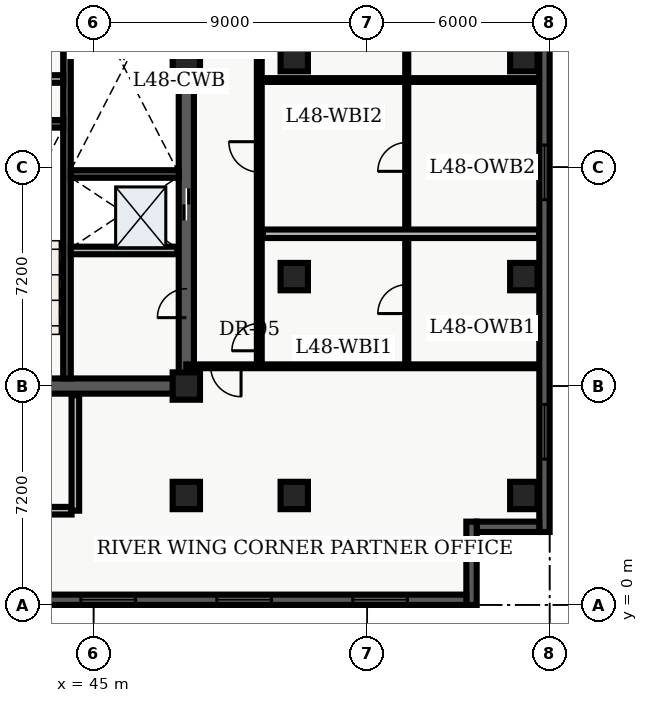
"""IFC4 building model, lengths in metres.
Left out: names, types, materials, properties, quantities, classifications, styles, units other than length and angle.
Written with IfcOpenShell. Run it as: python <this file> out.ifc"""

import sys

from ifc_helpers import new_model, entity, si_unit, converted_unit, direction, frame, origin_with_axes, origin_2d_with_axis, place, context, subcontext, project, spatial, polyline, rectangle, outline, extrude, element, fill, save


model = new_model("IFC4")
c1 = context("Model", 3, precision=1e-05, world=origin_with_axes(), true_north=direction((0.0, 1.0)))
c2 = subcontext(c1, "Body", "Model", "MODEL_VIEW")
j1 = project(units=[si_unit("LENGTHUNIT", "METRE"), converted_unit("PLANEANGLEUNIT", "DEGREE", entity("IfcPlaneAngleMeasure", 0.017), si_unit("PLANEANGLEUNIT", "RADIAN"), dimensions=[0, 0, 0, 0, 0, 0, 0])], contexts=[c1])
p1 = place(None, origin_with_axes())
s1 = spatial("IfcSite", under=j1, at=p1, CompositionType="ELEMENT")
p2 = place(p1, origin_with_axes())
s2 = spatial("IfcBuilding", under=s1, at=p2, CompositionType="ELEMENT")
p3 = place(p2, frame((0.0, 0.0, 196.5), z_axis=(0.0, 0.0, 1.0), x_axis=(1.0, 0.0, 0.0)))
s3 = spatial("IfcBuildingStorey", under=s2, at=p3, CompositionType="ELEMENT", Elevation=196.5)
p4 = place(p3, frame((40.2, 7.2, 0.0), z_axis=(0.0, 0.0, 1.0), x_axis=(1.0, 0.0, 0.0)))
e1 = element("IfcWall", 1, at=p4, inside=s3, PredefinedType="SHEAR", context=c2, shape_type="SweptSolid", body=[
    extrude(outline(polyline([(0.0, -0.25), (7.85, -0.25), (7.85, 0.25), (0.0, 0.25), (0.0, -0.25)])), origin_with_axes(), (0.0, 0.0, 1.0), 3.66),
])
p5 = place(p4, frame((2.175, 0.0, 0.0), z_axis=(0.0, 0.0, 1.0), x_axis=(1.0, 0.0, 0.0)))
e2 = element("IfcOpeningElement", 2, at=p5, cuts=e1, PredefinedType="OPENING", context=c2, shape_type="SweptSolid", body=[
    extrude(rectangle(XDim=1.05, YDim=0.52, at=origin_2d_with_axis()), origin_with_axes(), (0.0, 0.0, 1.0), 2.15),
])
p6 = place(p3, frame((48.05, 7.2, 0.0), z_axis=(0.0, 0.0, 1.0), x_axis=(0.0, 1.0, 0.0)))
e3 = element("IfcWall", 3, at=p6, inside=s3, PredefinedType="SHEAR", context=c2, shape_type="SweptSolid", body=[
    extrude(outline(polyline([(0.0, -0.25), (15.6, -0.25), (15.6, 0.25), (0.0, 0.25), (0.0, -0.25)])), origin_with_axes(), (0.0, 0.0, 1.0), 3.66),
])
p7 = place(p6, frame((5.975, 0.0, 0.0), z_axis=(0.0, 0.0, 1.0), x_axis=(1.0, 0.0, 0.0)))
e4 = element("IfcOpeningElement", 4, at=p7, cuts=e3, PredefinedType="OPENING", context=c2, shape_type="SweptSolid", body=[
    extrude(rectangle(XDim=1.05, YDim=0.52, at=origin_2d_with_axis()), origin_with_axes(), (0.0, 0.0, 1.0), 2.15),
])
p8 = place(p6, frame((2.725, 0.0, 0.0), z_axis=(0.0, 0.0, 1.0), x_axis=(1.0, 0.0, 0.0)))
e5 = element("IfcOpeningElement", 5, at=p8, cuts=e3, PredefinedType="OPENING", context=c2, shape_type="SweptSolid", body=[
    extrude(rectangle(XDim=0.95, YDim=0.52, at=origin_2d_with_axis()), origin_with_axes(), (0.0, 0.0, 1.0), 2.15),
])
p9 = place(p3, frame((44.125, 7.45, 0.0), z_axis=(0.0, 0.0, 1.0), x_axis=(0.0, 1.0, 0.0)))
e6 = element("IfcWall", 6, at=p9, inside=s3, PredefinedType="SHEAR", context=c2, shape_type="SweptSolid", body=[
    extrude(outline(polyline([(0.0, -0.125), (15.1, -0.125), (15.1, 0.125), (0.0, 0.125), (0.0, -0.125)])), origin_with_axes(), (0.0, 0.0, 1.0), 3.66),
])
for number, where, z_axis, x_axis in (
    (7, (40.45, 15.825, 0.0), (0.0, 0.0, 1.0), (1.0, 0.0, 0.0)),
    (8, (44.25, 14.175, 0.0), (0.0, 0.0, 1.0), (1.0, 0.0, 0.0)),
):
    element("IfcWall", number, at=place(p3, frame(where, z_axis=z_axis, x_axis=x_axis)), inside=s3, PredefinedType="SHEAR", context=c2, shape_type="SweptSolid", body=[
        extrude(outline(polyline([(0.0, -0.125), (3.55, -0.125), (3.55, 0.125), (0.0, 0.125), (0.0, -0.125)])), origin_with_axes(), (0.0, 0.0, 1.0), 3.66),
    ])
p10 = place(p3, frame((40.5, 17.3, 0.0), z_axis=(0.0, 0.0, 1.0), x_axis=(1.0, 0.0, 0.0)))
e9 = element("IfcWall", 9, at=p10, inside=s3, PredefinedType="SOLIDWALL", context=c2, shape_type="SweptSolid", body=[
    extrude(outline(polyline([(0.0, -0.125), (3.5, -0.125), (3.5, 0.125), (0.0, 0.125), (0.0, -0.125)])), origin_with_axes(), (0.0, 0.0, 1.0), 2.7),
])
p11 = place(p10, frame((2.4, 0.0, 0.0), z_axis=(0.0, 0.0, 1.0), x_axis=(1.0, 0.0, 0.0)))
e10 = element("IfcOpeningElement", 10, at=p11, cuts=e9, PredefinedType="OPENING", context=c2, shape_type="SweptSolid", body=[
    extrude(rectangle(XDim=0.9, YDim=0.27, at=origin_2d_with_axis()), origin_with_axes(), (0.0, 0.0, 1.0), 2.15),
])
p12 = place(p3, frame((40.325, 3.1, 0.0), z_axis=(0.0, 0.0, 1.0), x_axis=(1.0, 0.0, 0.0)))
e11 = element("IfcWall", 11, at=p12, inside=s3, PredefinedType="SOLIDWALL", context=c2, shape_type="SweptSolid", body=[
    extrude(outline(polyline([(0.0, -0.125), (3.95, -0.125), (3.95, 0.125), (0.0, 0.125), (0.0, -0.125)])), origin_with_axes(), (0.0, 0.0, 1.0), 2.7),
])
p13 = place(p3, frame((44.4, 3.1, 0.0), z_axis=(0.0, 0.0, 1.0), x_axis=(0.0, 1.0, 0.0)))
e12 = element("IfcWall", 12, at=p13, inside=s3, PredefinedType="SOLIDWALL", context=c2, shape_type="SweptSolid", body=[
    extrude(outline(polyline([(0.0, -0.125), (3.8, -0.125), (3.8, 0.125), (0.0, 0.125), (0.0, -0.125)])), origin_with_axes(), (0.0, 0.0, 1.0), 2.7),
])
for number, where, z_axis, x_axis in (
    (13, (48.05, 3.6, 0.0), (0.0, 0.0, 1.0), (1.0, 0.0, 0.0)),
    (14, (48.05, 7.2, 0.0), (0.0, 0.0, 1.0), (1.0, 0.0, 0.0)),
    (15, (48.05, 18.0, 0.0), (0.0, 0.0, 1.0), (1.0, 0.0, 0.0)),
    (16, (51.6, 3.6, 0.0), (0.0, 0.0, 1.0), (1.0, 0.0, 0.0)),
    (17, (51.6, 10.8, 0.0), (0.0, 0.0, 1.0), (1.0, 0.0, 0.0)),
    (18, (51.6, 18.0, 0.0), (0.0, 0.0, 1.0), (1.0, 0.0, 0.0)),
    (19, (59.15, 3.6, 0.0), (0.0, 0.0, 1.0), (1.0, 0.0, 0.0)),
    (20, (59.15, 10.8, 0.0), (0.0, 0.0, 1.0), (1.0, 0.0, 0.0)),
    (21, (59.15, 18.0, 0.0), (0.0, 0.0, 1.0), (1.0, 0.0, 0.0)),
):
    element("IfcColumn", number, at=place(p3, frame(where, z_axis=z_axis, x_axis=x_axis)), inside=s3, PredefinedType="COLUMN", context=c2, shape_type="SweptSolid", body=[
        extrude(rectangle(XDim=0.9, YDim=0.9, at=origin_2d_with_axis()), origin_with_axes(), (0.0, 0.0, 1.0), 3.9),
    ])
p14 = place(p3, frame((44.25, 11.66, 0.0), z_axis=(0.0, 0.0, 1.0), x_axis=(1.0, 0.0, 0.0)))
e22 = element("IfcWall", 22, at=p14, inside=s3, PredefinedType="SOLIDWALL", context=c2, shape_type="SweptSolid", body=[
    extrude(outline(polyline([(0.0, -0.125), (3.5, -0.125), (3.5, 0.125), (0.0, 0.125), (0.0, -0.125)])), origin_with_axes(), (0.0, 0.0, 1.0), 2.7),
])
p15 = place(p3, frame((50.45, 7.85, 0.0), z_axis=(0.0, 0.0, 1.0), x_axis=(0.0, 1.0, 0.0)))
e23 = element("IfcWall", 23, at=p15, inside=s3, PredefinedType="PARTITIONING", context=c2, shape_type="SweptSolid", body=[
    extrude(outline(polyline([(0.0, -0.08), (18.8, -0.08), (18.8, 0.08), (0.0, 0.08), (0.0, -0.08)])), origin_with_axes(), (0.0, 0.0, 1.0), 2.7),
])
p16 = place(p15, frame((0.96, 0.0, 0.0), z_axis=(0.0, 0.0, 1.0), x_axis=(1.0, 0.0, 0.0)))
e24 = element("IfcOpeningElement", 24, at=p16, cuts=e23, PredefinedType="OPENING", context=c2, shape_type="SweptSolid", body=[
    extrude(rectangle(XDim=0.9, YDim=0.18, at=origin_2d_with_axis()), origin_with_axes(), (0.0, 0.0, 1.0), 2.15),
])
p17 = place(p15, frame((6.888, 0.0, 0.0), z_axis=(0.0, 0.0, 1.0), x_axis=(1.0, 0.0, 0.0)))
e25 = element("IfcOpeningElement", 25, at=p17, cuts=e23, PredefinedType="OPENING", context=c2, shape_type="SweptSolid", body=[
    extrude(rectangle(XDim=1.0, YDim=0.18, at=origin_2d_with_axis()), origin_with_axes(), (0.0, 0.0, 1.0), 2.15),
])
p18 = place(p15, frame((12.353, 0.0, 0.0), z_axis=(0.0, 0.0, 1.0), x_axis=(1.0, 0.0, 0.0)))
e26 = element("IfcOpeningElement", 26, at=p18, cuts=e23, PredefinedType="OPENING", context=c2, shape_type="SweptSolid", body=[
    extrude(rectangle(XDim=1.0, YDim=0.18, at=origin_2d_with_axis()), origin_with_axes(), (0.0, 0.0, 1.0), 2.15),
])
p19 = place(p15, frame((17.575, 0.0, 0.0), z_axis=(0.0, 0.0, 1.0), x_axis=(1.0, 0.0, 0.0)))
e27 = element("IfcOpeningElement", 27, at=p19, cuts=e23, PredefinedType="OPENING", context=c2, shape_type="SweptSolid", body=[
    extrude(rectangle(XDim=1.0, YDim=0.18, at=origin_2d_with_axis()), origin_with_axes(), (0.0, 0.0, 1.0), 2.15),
])
p20 = place(p3, frame((59.665, 7.85, 0.0), z_axis=(0.0, 0.0, 1.0), x_axis=(-1.0, 0.0, 0.0)))
e28 = element("IfcWall", 28, at=p20, inside=s3, PredefinedType="PARTITIONING", context=c2, shape_type="SweptSolid", body=[
    extrude(outline(polyline([(0.0, -0.062), (11.615, -0.062), (11.615, 0.062), (0.0, 0.062), (0.0, -0.062)])), origin_with_axes(), (0.0, 0.0, 1.0), 2.7),
])
p21 = place(p20, frame((10.315, 0.0, 0.0), z_axis=(0.0, 0.0, 1.0), x_axis=(1.0, 0.0, 0.0)))
e29 = element("IfcOpeningElement", 29, at=p21, cuts=e28, PredefinedType="OPENING", context=c2, shape_type="SweptSolid", body=[
    extrude(rectangle(XDim=1.0, YDim=0.145, at=origin_2d_with_axis()), origin_with_axes(), (0.0, 0.0, 1.0), 2.15),
])
p22 = place(p3, frame((55.3, 7.98, 0.0), z_axis=(0.0, 0.0, 1.0), x_axis=(0.0, 1.0, 0.0)))
e30 = element("IfcWall", 30, at=p22, inside=s3, PredefinedType="PARTITIONING", context=c2, shape_type="SweptSolid", body=[
    extrude(outline(polyline([(0.0, -0.05), (18.54, -0.05), (18.54, 0.05), (0.0, 0.05), (0.0, -0.05)])), origin_with_axes(), (0.0, 0.0, 1.0), 2.7),
])
p23 = place(p22, frame((2.079, 0.0, 0.0), z_axis=(0.0, 0.0, 1.0), x_axis=(1.0, 0.0, 0.0)))
e31 = element("IfcOpeningElement", 31, at=p23, cuts=e30, PredefinedType="OPENING", context=c2, shape_type="SweptSolid", body=[
    extrude(rectangle(XDim=0.95, YDim=0.12, at=origin_2d_with_axis()), origin_with_axes(), (0.0, 0.0, 1.0), 2.15),
])
p24 = place(p22, frame((6.758, 0.0, 0.0), z_axis=(0.0, 0.0, 1.0), x_axis=(1.0, 0.0, 0.0)))
e32 = element("IfcOpeningElement", 32, at=p24, cuts=e30, PredefinedType="OPENING", context=c2, shape_type="SweptSolid", body=[
    extrude(rectangle(XDim=0.95, YDim=0.12, at=origin_2d_with_axis()), origin_with_axes(), (0.0, 0.0, 1.0), 2.15),
])
p25 = place(p22, frame((12.223, 0.0, 0.0), z_axis=(0.0, 0.0, 1.0), x_axis=(1.0, 0.0, 0.0)))
e33 = element("IfcOpeningElement", 33, at=p25, cuts=e30, PredefinedType="OPENING", context=c2, shape_type="SweptSolid", body=[
    extrude(rectangle(XDim=0.95, YDim=0.12, at=origin_2d_with_axis()), origin_with_axes(), (0.0, 0.0, 1.0), 2.15),
])
p26 = place(p22, frame((16.885, 0.0, 0.0), z_axis=(0.0, 0.0, 1.0), x_axis=(1.0, 0.0, 0.0)))
e34 = element("IfcOpeningElement", 34, at=p26, cuts=e30, PredefinedType="OPENING", context=c2, shape_type="SweptSolid", body=[
    extrude(rectangle(XDim=0.95, YDim=0.12, at=origin_2d_with_axis()), origin_with_axes(), (0.0, 0.0, 1.0), 2.15),
])
p27 = place(p3, frame((50.57, 12.209, 0.0), z_axis=(0.0, 0.0, 1.0), x_axis=(1.0, 0.0, 0.0)))
e35 = element("IfcWall", 35, at=p27, inside=s3, PredefinedType="PARTITIONING", context=c2, shape_type="SweptSolid", body=[
    extrude(outline(polyline([(0.0, -0.14), (9.095, -0.14), (9.095, 0.14), (0.0, 0.14), (0.0, -0.14)])), origin_with_axes(), (0.0, 0.0, 1.0), 2.7),
])
p28 = place(p3, frame((50.57, 17.266, 0.0), z_axis=(0.0, 0.0, 1.0), x_axis=(1.0, 0.0, 0.0)))
e36 = element("IfcWall", 36, at=p28, inside=s3, PredefinedType="PARTITIONING", context=c2, shape_type="SweptSolid", body=[
    extrude(outline(polyline([(0.0, -0.062), (9.095, -0.062), (9.095, 0.062), (0.0, 0.062), (0.0, -0.062)])), origin_with_axes(), (0.0, 0.0, 1.0), 2.7),
])
p29 = place(p3, frame((59.83, 26.06, 0.0), z_axis=(0.0, 0.0, 1.0), x_axis=(0.0, -1.0, 0.0)))
e37 = element("IfcWall", 37, at=p29, inside=s3, PredefinedType="SOLIDWALL", context=c2, shape_type="SweptSolid", body=[
    extrude(outline(polyline([(0.0, -0.17), (23.66, -0.17), (23.66, 0.17), (0.0, 0.17), (0.0, -0.17)])), origin_with_axes(), (0.0, 0.0, 1.0), 3.66),
])
p30 = place(p29, frame((11.83, 0.0, 0.45), z_axis=(0.0, 0.0, 1.0), x_axis=(1.0, 0.0, 0.0)))
e38 = element("IfcOpeningElement", 38, at=p30, cuts=e37, PredefinedType="OPENING", context=c2, shape_type="SweptSolid", body=[
    extrude(rectangle(XDim=1.8, YDim=0.36, at=origin_2d_with_axis()), origin_with_axes(), (0.0, 0.0, 1.0), 2.1),
])
p31 = place(p29, frame((20.364, 0.0, 0.45), z_axis=(0.0, 0.0, 1.0), x_axis=(1.0, 0.0, 0.0)))
e39 = element("IfcOpeningElement", 39, at=p31, cuts=e37, PredefinedType="OPENING", context=c2, shape_type="SweptSolid", body=[
    extrude(rectangle(XDim=1.8, YDim=0.36, at=origin_2d_with_axis()), origin_with_axes(), (0.0, 0.0, 1.0), 2.1),
])
p32 = place(p3, frame((59.66, 2.57, 0.0), z_axis=(0.0, 0.0, 1.0), x_axis=(-1.0, 0.0, 0.0)))
e40 = element("IfcWall", 40, at=p32, inside=s3, PredefinedType="SOLIDWALL", context=c2, shape_type="SweptSolid", body=[
    extrude(outline(polyline([(0.0, -0.17), (2.06, -0.17), (2.06, 0.17), (0.0, 0.17), (0.0, -0.17)])), origin_with_axes(), (0.0, 0.0, 1.0), 3.66),
])
p33 = place(p3, frame((57.43, 2.74, 0.0), z_axis=(0.0, 0.0, 1.0), x_axis=(0.0, -1.0, 0.0)))
e41 = element("IfcWall", 41, at=p33, inside=s3, PredefinedType="SOLIDWALL", context=c2, shape_type="SweptSolid", body=[
    extrude(outline(polyline([(0.0, -0.17), (2.74, -0.17), (2.74, 0.17), (0.0, 0.17), (0.0, -0.17)])), origin_with_axes(), (0.0, 0.0, 1.0), 3.66),
])
p34 = place(p3, frame((57.26, 0.17, 0.0), z_axis=(0.0, 0.0, 1.0), x_axis=(-1.0, 0.0, 0.0)))
e42 = element("IfcWall", 42, at=p34, inside=s3, PredefinedType="SOLIDWALL", context=c2, shape_type="SweptSolid", body=[
    extrude(outline(polyline([(0.0, -0.17), (54.86, -0.17), (54.86, 0.17), (0.0, 0.17), (0.0, -0.17)])), origin_with_axes(), (0.0, 0.0, 1.0), 3.66),
])
p35 = place(p34, frame((2.836, 0.0, 0.45), z_axis=(0.0, 0.0, 1.0), x_axis=(1.0, 0.0, 0.0)))
e43 = element("IfcOpeningElement", 43, at=p35, cuts=e42, PredefinedType="OPENING", context=c2, shape_type="SweptSolid", body=[
    extrude(rectangle(XDim=1.8, YDim=0.36, at=origin_2d_with_axis()), origin_with_axes(), (0.0, 0.0, 1.0), 2.1),
])
p36 = place(p34, frame((7.307, 0.0, 0.45), z_axis=(0.0, 0.0, 1.0), x_axis=(1.0, 0.0, 0.0)))
e44 = element("IfcOpeningElement", 44, at=p36, cuts=e42, PredefinedType="OPENING", context=c2, shape_type="SweptSolid", body=[
    extrude(rectangle(XDim=1.8, YDim=0.36, at=origin_2d_with_axis()), origin_with_axes(), (0.0, 0.0, 1.0), 2.1),
])
p37 = place(p34, frame((11.779, 0.0, 0.45), z_axis=(0.0, 0.0, 1.0), x_axis=(1.0, 0.0, 0.0)))
e45 = element("IfcOpeningElement", 45, at=p37, cuts=e42, PredefinedType="OPENING", context=c2, shape_type="SweptSolid", body=[
    extrude(rectangle(XDim=1.8, YDim=0.36, at=origin_2d_with_axis()), origin_with_axes(), (0.0, 0.0, 1.0), 2.1),
])
p38 = place(p34, frame((16.251, 0.0, 0.45), z_axis=(0.0, 0.0, 1.0), x_axis=(1.0, 0.0, 0.0)))
e46 = element("IfcOpeningElement", 46, at=p38, cuts=e42, PredefinedType="OPENING", context=c2, shape_type="SweptSolid", body=[
    extrude(rectangle(XDim=1.8, YDim=0.36, at=origin_2d_with_axis()), origin_with_axes(), (0.0, 0.0, 1.0), 2.1),
])
p39 = place(p34, frame((20.723, 0.0, 0.45), z_axis=(0.0, 0.0, 1.0), x_axis=(1.0, 0.0, 0.0)))
e47 = element("IfcOpeningElement", 47, at=p39, cuts=e42, PredefinedType="OPENING", context=c2, shape_type="SweptSolid", body=[
    extrude(rectangle(XDim=1.8, YDim=0.36, at=origin_2d_with_axis()), origin_with_axes(), (0.0, 0.0, 1.0), 2.1),
])
p40 = place(p34, frame((34.138, 0.0, 0.45), z_axis=(0.0, 0.0, 1.0), x_axis=(1.0, 0.0, 0.0)))
e48 = element("IfcOpeningElement", 48, at=p40, cuts=e42, PredefinedType="OPENING", context=c2, shape_type="SweptSolid", body=[
    extrude(rectangle(XDim=1.8, YDim=0.36, at=origin_2d_with_axis()), origin_with_axes(), (0.0, 0.0, 1.0), 2.1),
])
p41 = place(p34, frame((38.609, 0.0, 0.45), z_axis=(0.0, 0.0, 1.0), x_axis=(1.0, 0.0, 0.0)))
e49 = element("IfcOpeningElement", 49, at=p41, cuts=e42, PredefinedType="OPENING", context=c2, shape_type="SweptSolid", body=[
    extrude(rectangle(XDim=1.8, YDim=0.36, at=origin_2d_with_axis()), origin_with_axes(), (0.0, 0.0, 1.0), 2.1),
])
p42 = place(p34, frame((43.531, 0.0, 0.45), z_axis=(0.0, 0.0, 1.0), x_axis=(1.0, 0.0, 0.0)))
e50 = element("IfcOpeningElement", 50, at=p42, cuts=e42, PredefinedType="OPENING", context=c2, shape_type="SweptSolid", body=[
    extrude(rectangle(XDim=1.8, YDim=0.36, at=origin_2d_with_axis()), origin_with_axes(), (0.0, 0.0, 1.0), 2.1),
])
p43 = place(p34, frame((47.553, 0.0, 0.45), z_axis=(0.0, 0.0, 1.0), x_axis=(1.0, 0.0, 0.0)))
e51 = element("IfcOpeningElement", 51, at=p43, cuts=e42, PredefinedType="OPENING", context=c2, shape_type="SweptSolid", body=[
    extrude(rectangle(XDim=1.8, YDim=0.36, at=origin_2d_with_axis()), origin_with_axes(), (0.0, 0.0, 1.0), 2.1),
])
p44 = place(p34, frame((52.024, 0.0, 0.45), z_axis=(0.0, 0.0, 1.0), x_axis=(1.0, 0.0, 0.0)))
e52 = element("IfcOpeningElement", 52, at=p44, cuts=e42, PredefinedType="OPENING", context=c2, shape_type="SweptSolid", body=[
    extrude(rectangle(XDim=1.8, YDim=0.36, at=origin_2d_with_axis()), origin_with_axes(), (0.0, 0.0, 1.0), 2.1),
])
p45 = place(p6, frame((5.975, 0.0, 0.0), z_axis=(0.0, 0.0, 1.0), x_axis=(1.0, 0.0, 0.0)))
e53 = element("IfcDoor", 53, at=p45, inside=s3, OperationType="SLIDING_TO_LEFT", PredefinedType="DOOR", context=c2, shape_type="SweptSolid", body=[
    extrude(rectangle(XDim=1.05, YDim=0.09, at=origin_2d_with_axis()), origin_with_axes(), (0.0, 0.0, 1.0), 2.15),
])
fill(e4, e53)
p46 = place(p6, frame((2.725, 0.0, 0.0), z_axis=(0.0, 0.0, 1.0), x_axis=(1.0, 0.0, 0.0)))
e54 = element("IfcDoor", 54, at=p46, inside=s3, OperationType="SINGLE_SWING_LEFT", PredefinedType="DOOR", context=c2, shape_type="SweptSolid", body=[
    extrude(rectangle(XDim=0.95, YDim=0.09, at=origin_2d_with_axis()), origin_with_axes(), (0.0, 0.0, 1.0), 2.15),
])
fill(e5, e54)
p47 = place(p20, frame((10.315, 0.0, 0.0), z_axis=(0.0, 0.0, 1.0), x_axis=(1.0, 0.0, 0.0)))
e55 = element("IfcDoor", 55, at=p47, inside=s3, OperationType="SINGLE_SWING_LEFT", PredefinedType="DOOR", context=c2, shape_type="SweptSolid", body=[
    extrude(rectangle(XDim=1.0, YDim=0.075, at=origin_2d_with_axis()), origin_with_axes(), (0.0, 0.0, 1.0), 2.15),
])
fill(e29, e55)
p48 = place(p22, frame((2.079, 0.0, 0.0), z_axis=(0.0, 0.0, 1.0), x_axis=(1.0, 0.0, 0.0)))
e56 = element("IfcDoor", 56, at=p48, inside=s3, OperationType="SINGLE_SWING_LEFT", PredefinedType="DOOR", context=c2, shape_type="SweptSolid", body=[
    extrude(rectangle(XDim=0.95, YDim=0.06, at=origin_2d_with_axis()), origin_with_axes(), (0.0, 0.0, 1.0), 2.15),
])
fill(e31, e56)
p49 = place(p15, frame((0.96, 0.0, 0.0), z_axis=(0.0, 0.0, 1.0), x_axis=(1.0, 0.0, 0.0)))
e57 = element("IfcDoor", 57, at=p49, inside=s3, OperationType="SINGLE_SWING_LEFT", PredefinedType="DOOR", context=c2, shape_type="SweptSolid", body=[
    extrude(rectangle(XDim=0.9, YDim=0.09, at=origin_2d_with_axis()), origin_with_axes(), (0.0, 0.0, 1.0), 2.15),
])
fill(e24, e57)
p50 = place(p22, frame((6.758, 0.0, 0.0), z_axis=(0.0, 0.0, 1.0), x_axis=(1.0, 0.0, 0.0)))
e58 = element("IfcDoor", 58, at=p50, inside=s3, OperationType="SINGLE_SWING_LEFT", PredefinedType="DOOR", context=c2, shape_type="SweptSolid", body=[
    extrude(rectangle(XDim=0.95, YDim=0.06, at=origin_2d_with_axis()), origin_with_axes(), (0.0, 0.0, 1.0), 2.15),
])
fill(e32, e58)
p51 = place(p15, frame((6.888, 0.0, 0.0), z_axis=(0.0, 0.0, 1.0), x_axis=(1.0, 0.0, 0.0)))
e59 = element("IfcDoor", 59, at=p51, inside=s3, OperationType="SINGLE_SWING_RIGHT", PredefinedType="DOOR", context=c2, shape_type="SweptSolid", body=[
    extrude(rectangle(XDim=1.0, YDim=0.09, at=origin_2d_with_axis()), origin_with_axes(), (0.0, 0.0, 1.0), 2.15),
])
fill(e25, e59)
p52 = place(p29, frame((11.83, 0.0, 0.45), z_axis=(0.0, 0.0, 1.0), x_axis=(1.0, 0.0, 0.0)))
e60 = element("IfcWindow", 60, at=p52, inside=s3, PredefinedType="WINDOW", context=c2, shape_type="SweptSolid", body=[
    extrude(rectangle(XDim=1.8, YDim=0.09, at=origin_2d_with_axis()), origin_with_axes(), (0.0, 0.0, 1.0), 2.1),
])
fill(e38, e60)
p53 = place(p29, frame((20.364, 0.0, 0.45), z_axis=(0.0, 0.0, 1.0), x_axis=(1.0, 0.0, 0.0)))
e61 = element("IfcWindow", 61, at=p53, inside=s3, PredefinedType="WINDOW", context=c2, shape_type="SweptSolid", body=[
    extrude(rectangle(XDim=1.8, YDim=0.09, at=origin_2d_with_axis()), origin_with_axes(), (0.0, 0.0, 1.0), 2.1),
])
fill(e39, e61)
p54 = place(p34, frame((2.836, 0.0, 0.45), z_axis=(0.0, 0.0, 1.0), x_axis=(1.0, 0.0, 0.0)))
e62 = element("IfcWindow", 62, at=p54, inside=s3, PredefinedType="WINDOW", context=c2, shape_type="SweptSolid", body=[
    extrude(rectangle(XDim=1.8, YDim=0.09, at=origin_2d_with_axis()), origin_with_axes(), (0.0, 0.0, 1.0), 2.1),
])
fill(e43, e62)
p55 = place(p34, frame((7.307, 0.0, 0.45), z_axis=(0.0, 0.0, 1.0), x_axis=(1.0, 0.0, 0.0)))
e63 = element("IfcWindow", 63, at=p55, inside=s3, PredefinedType="WINDOW", context=c2, shape_type="SweptSolid", body=[
    extrude(rectangle(XDim=1.8, YDim=0.09, at=origin_2d_with_axis()), origin_with_axes(), (0.0, 0.0, 1.0), 2.1),
])
fill(e44, e63)
p56 = place(p34, frame((11.779, 0.0, 0.45), z_axis=(0.0, 0.0, 1.0), x_axis=(1.0, 0.0, 0.0)))
e64 = element("IfcWindow", 64, at=p56, inside=s3, PredefinedType="WINDOW", context=c2, shape_type="SweptSolid", body=[
    extrude(rectangle(XDim=1.8, YDim=0.09, at=origin_2d_with_axis()), origin_with_axes(), (0.0, 0.0, 1.0), 2.1),
])
fill(e45, e64)
save(model, sys.argv[1])
